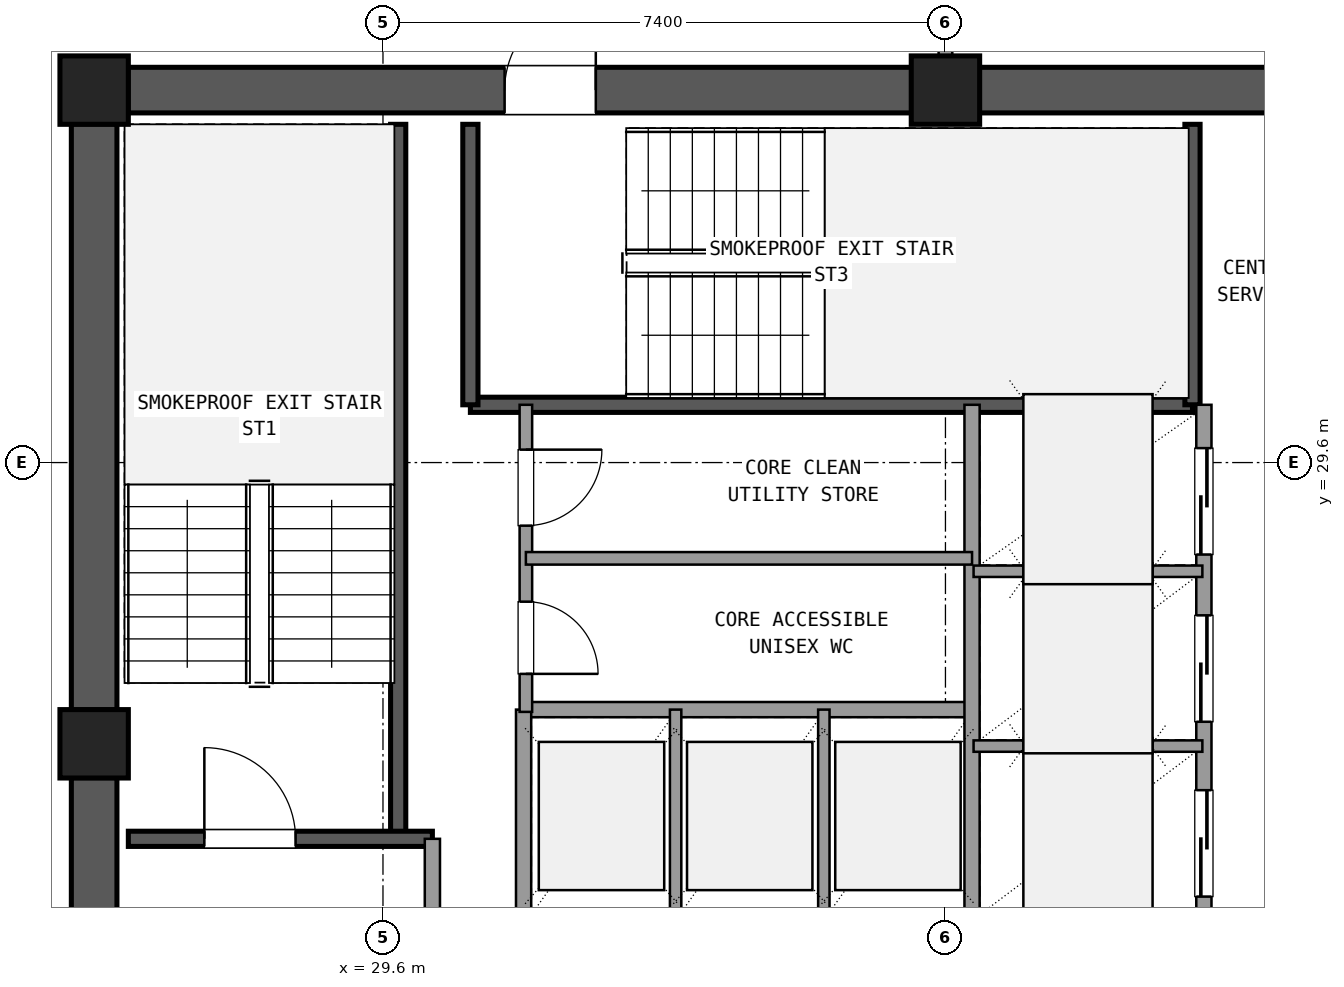
"""IFC4 building model, lengths in metres.
Left out: names, types, materials, properties, quantities, classifications, styles, units other than length and angle.
Written with IfcOpenShell. Run it as: python <this file> out.ifc"""

import sys

from ifc_helpers import new_model, si_unit, direction, frame, frame_2d, origin, origin_2d, place, context, subcontext, project, spatial, rectangle, extrude, element, fill, save


model = new_model("IFC4")
c1 = context("Model", 3, precision=1e-05, world=origin(), true_north=direction((0.0, 1.0)))
c2 = subcontext(c1, "Body", "Model", "MODEL_VIEW")
j1 = project(units=[si_unit("LENGTHUNIT", "METRE"), si_unit("PLANEANGLEUNIT", "RADIAN")], contexts=[c1])
p1 = place(None, origin())
s1 = spatial("IfcSite", under=j1, at=p1, CompositionType="ELEMENT")
p2 = place(p1, origin())
s2 = spatial("IfcBuilding", under=s1, at=p2, CompositionType="ELEMENT")
p3 = place(p2, frame((0.0, 0.0, 228.78)))
s3 = spatial("IfcBuildingStorey", under=s2, at=p3, CompositionType="ELEMENT", Elevation=228.78)
for number, where, z_axis, x_axis in (
    (1, (37.0, 34.5, 0.0), (0.0, 0.0, 1.0), (1.0, 0.0, 0.0)),
    (2, (25.8, 34.5, 0.0), (0.0, 0.0, 1.0), (1.0, 0.0, 0.0)),
    (3, (25.8, 25.9, 0.0), (0.0, 0.0, 1.0), (1.0, 0.0, 0.0)),
):
    element("IfcColumn", number, at=place(p3, frame(where, z_axis=z_axis, x_axis=x_axis)), inside=s3, PredefinedType="COLUMN", context=c2, shape_type="SweptSolid", body=[
        extrude(rectangle(XDim=0.9, YDim=0.9, at=origin_2d()), origin(), (0.0, 0.0, 1.0), 3.6),
    ])
p4 = place(p3, frame((47.755, 34.5, 0.0), z_axis=(0.0, 0.0, 1.0), x_axis=(-1.0, 0.0, 0.0)))
e4 = element("IfcWall", 4, at=p4, inside=s3, PredefinedType="SHEAR", context=c2, shape_type="SweptSolid", body=[
    extrude(rectangle(XDim=10.31, YDim=0.6, at=frame_2d((5.155, 0.0))), origin(), (0.0, 0.0, 1.0), 3.3),
])
p5 = place(p4, frame((4.655, 0.0, 0.0)))
e5 = element("IfcOpeningElement", 5, at=p5, cuts=e4, PredefinedType="OPENING", context=c2, shape_type="SweptSolid", body=[
    extrude(rectangle(XDim=1.6, YDim=2.2, at=frame_2d((0.8, 1.1))), frame((0.0, 0.31, 0.0), z_axis=(0.0, -1.0, 0.0), x_axis=(1.0, 0.0, 0.0)), (0.0, 0.0, 1.0), 0.62),
])
p6 = place(p3, frame((36.555, 34.5, 0.0), z_axis=(0.0, 0.0, 1.0), x_axis=(-1.0, 0.0, 0.0)))
e6 = element("IfcWall", 6, at=p6, inside=s3, PredefinedType="SHEAR", context=c2, shape_type="SweptSolid", body=[
    extrude(rectangle(XDim=10.31, YDim=0.6, at=frame_2d((5.155, 0.0))), origin(), (0.0, 0.0, 1.0), 3.3),
])
p7 = place(p6, frame((4.155, 0.0, 0.0)))
e7 = element("IfcOpeningElement", 7, at=p7, cuts=e6, PredefinedType="OPENING", context=c2, shape_type="SweptSolid", body=[
    extrude(rectangle(XDim=1.2, YDim=2.15, at=frame_2d((0.6, 1.075))), frame((0.0, 0.31, 0.0), z_axis=(0.0, -1.0, 0.0), x_axis=(1.0, 0.0, 0.0)), (0.0, 0.0, 1.0), 0.62),
])
p8 = place(p3, frame((25.8, 34.055, 0.0), z_axis=(0.0, 0.0, 1.0), x_axis=(0.0, -1.0, 0.0)))
e8 = element("IfcWall", 8, at=p8, inside=s3, PredefinedType="SHEAR", context=c2, shape_type="SweptSolid", body=[
    extrude(rectangle(XDim=7.71, YDim=0.6, at=frame_2d((3.855, 0.0))), origin(), (0.0, 0.0, 1.0), 3.3),
])
p9 = place(p3, frame((25.8, 25.455, 0.0), z_axis=(0.0, 0.0, 1.0), x_axis=(0.0, -1.0, 0.0)))
e9 = element("IfcWall", 9, at=p9, inside=s3, PredefinedType="SHEAR", context=c2, shape_type="SweptSolid", body=[
    extrude(rectangle(XDim=7.71, YDim=0.6, at=frame_2d((3.855, 0.0))), origin(), (0.0, 0.0, 1.0), 3.3),
])
p10 = place(p9, frame((2.205, 0.0, 0.0)))
e10 = element("IfcOpeningElement", 10, at=p10, cuts=e9, PredefinedType="OPENING", context=c2, shape_type="SweptSolid", body=[
    extrude(rectangle(XDim=1.2, YDim=2.15, at=frame_2d((0.6, 1.075))), frame((0.0, 0.31, 0.0), z_axis=(0.0, -1.0, 0.0), x_axis=(1.0, 0.0, 0.0)), (0.0, 0.0, 1.0), 0.62),
])
p11 = place(p3, frame((29.8, 24.65, 0.0), z_axis=(0.0, 0.0, 1.0), x_axis=(0.0, 1.0, 0.0)))
e11 = element("IfcWall", 11, at=p11, inside=s3, PredefinedType="SHEAR", context=c2, shape_type="SweptSolid", body=[
    extrude(rectangle(XDim=9.4, YDim=0.2, at=frame_2d((4.7, 0.0))), origin(), (0.0, 0.0, 1.0), 3.3),
])
p12 = place(p3, frame((26.25, 24.65, 0.0), z_axis=(0.0, 0.0, 1.0), x_axis=(1.0, 0.0, 0.0)))
e12 = element("IfcWall", 12, at=p12, inside=s3, PredefinedType="SHEAR", context=c2, shape_type="SweptSolid", body=[
    extrude(rectangle(XDim=4.0, YDim=0.2, at=frame_2d((2.0, 0.0))), origin(), (0.0, 0.0, 1.0), 3.3),
])
p13 = place(p12, frame((1.0, 0.0, 0.0)))
e13 = element("IfcOpeningElement", 13, at=p13, cuts=e12, PredefinedType="OPENING", context=c2, shape_type="SweptSolid", body=[
    extrude(rectangle(XDim=1.2, YDim=2.15, at=frame_2d((0.6, 1.075))), frame((0.0, 0.11, 0.0), z_axis=(0.0, -1.0, 0.0), x_axis=(1.0, 0.0, 0.0)), (0.0, 0.0, 1.0), 0.22),
])
p14 = place(p3, frame((30.75, 30.36, 0.0), z_axis=(0.0, 0.0, 1.0), x_axis=(1.0, 0.0, 0.0)))
e14 = element("IfcWall", 14, at=p14, inside=s3, PredefinedType="SHEAR", context=c2, shape_type="SweptSolid", body=[
    extrude(rectangle(XDim=9.5, YDim=0.2, at=frame_2d((4.75, 0.0))), origin(), (0.0, 0.0, 1.0), 3.3),
])
for number, where, z_axis, x_axis in (
    (15, (30.75, 30.36, 0.0), (0.0, 0.0, 1.0), (0.0, 1.0, 0.0)),
    (16, (40.25, 30.36, 0.0), (0.0, 0.0, 1.0), (0.0, 1.0, 0.0)),
):
    element("IfcWall", number, at=place(p3, frame(where, z_axis=z_axis, x_axis=x_axis)), inside=s3, PredefinedType="SHEAR", context=c2, shape_type="SweptSolid", body=[
        extrude(rectangle(XDim=3.69, YDim=0.2, at=frame_2d((1.845, 0.0))), origin(), (0.0, 0.0, 1.0), 3.3),
    ])
p15 = place(p3, frame((30.25, 17.75, 0.0), z_axis=(0.0, 0.0, 1.0), x_axis=(0.0, 1.0, 0.0)))
e17 = element("IfcWall", 17, at=p15, inside=s3, PredefinedType="SOLIDWALL", context=c2, shape_type="SweptSolid", body=[
    extrude(rectangle(XDim=6.9, YDim=0.2, at=frame_2d((3.45, 0.0))), origin(), (0.0, 0.0, 1.0), 2.59),
])
p16 = place(p15, frame((4.15, 0.0, 0.0)))
e18 = element("IfcOpeningElement", 18, at=p16, cuts=e17, PredefinedType="OPENING", context=c2, shape_type="SweptSolid", body=[
    extrude(rectangle(XDim=1.2, YDim=2.15, at=frame_2d((0.6, 1.075))), frame((0.0, 0.11, 0.0), z_axis=(0.0, -1.0, 0.0), x_axis=(1.0, 0.0, 0.0)), (0.0, 0.0, 1.0), 0.22),
])
p17 = place(p3, frame((31.45, 26.35, 0.0), z_axis=(0.0, 0.0, 1.0), x_axis=(1.0, 0.0, 0.0)))
e19 = element("IfcWall", 19, at=p17, inside=s3, PredefinedType="SOLIDWALL", context=c2, shape_type="SweptSolid", body=[
    extrude(rectangle(XDim=5.9, YDim=0.2, at=frame_2d((2.95, 0.0))), origin(), (0.0, 0.0, 1.0), 2.59),
])
p18 = place(p3, frame((31.45, 23.54, 0.0), z_axis=(0.0, 0.0, 1.0), x_axis=(0.0, 1.0, 0.0)))
e20 = element("IfcWall", 20, at=p18, inside=s3, PredefinedType="SOLIDWALL", context=c2, shape_type="SweptSolid", body=[
    extrude(rectangle(XDim=2.81, YDim=0.2, at=frame_2d((1.405, 0.0))), origin(), (0.0, 0.0, 1.0), 2.59),
])
for number, where, z_axis, x_axis in (
    (21, (33.45, 23.54, 0.0), (0.0, 0.0, 1.0), (0.0, 1.0, 0.0)),
    (22, (35.4, 23.54, 0.0), (0.0, 0.0, 1.0), (0.0, 1.0, 0.0)),
):
    element("IfcWall", number, at=place(p3, frame(where, z_axis=z_axis, x_axis=x_axis)), inside=s3, PredefinedType="PARTITIONING", context=c2, shape_type="SweptSolid", body=[
        extrude(rectangle(XDim=2.81, YDim=0.15, at=frame_2d((1.405, 0.0))), origin(), (0.0, 0.0, 1.0), 2.59),
    ])
p19 = place(p3, frame((37.35, 23.54, 0.0), z_axis=(0.0, 0.0, 1.0), x_axis=(0.0, 1.0, 0.0)))
e23 = element("IfcWall", 23, at=p19, inside=s3, PredefinedType="SOLIDWALL", context=c2, shape_type="SweptSolid", body=[
    extrude(rectangle(XDim=6.82, YDim=0.2, at=frame_2d((3.41, 0.0))), origin(), (0.0, 0.0, 1.0), 2.59),
])
p20 = place(p3, frame((40.4, 23.54, 0.0), z_axis=(0.0, 0.0, 1.0), x_axis=(0.0, 1.0, 0.0)))
e24 = element("IfcWall", 24, at=p20, inside=s3, PredefinedType="SOLIDWALL", context=c2, shape_type="SweptSolid", body=[
    extrude(rectangle(XDim=6.82, YDim=0.2, at=frame_2d((3.41, 0.0))), origin(), (0.0, 0.0, 1.0), 2.59),
])
p21 = place(p20, frame((0.35, 0.0, 0.0)))
e25 = element("IfcOpeningElement", 25, at=p21, cuts=e24, PredefinedType="OPENING", context=c2, shape_type="SweptSolid", body=[
    extrude(rectangle(XDim=1.4, YDim=2.2, at=frame_2d((0.7, 1.1))), frame((0.0, 0.11, 0.0), z_axis=(0.0, -1.0, 0.0), x_axis=(1.0, 0.0, 0.0)), (0.0, 0.0, 1.0), 0.22),
])
p22 = place(p20, frame((2.65, 0.0, 0.0)))
e26 = element("IfcOpeningElement", 26, at=p22, cuts=e24, PredefinedType="OPENING", context=c2, shape_type="SweptSolid", body=[
    extrude(rectangle(XDim=1.4, YDim=2.2, at=frame_2d((0.7, 1.1))), frame((0.0, 0.11, 0.0), z_axis=(0.0, -1.0, 0.0), x_axis=(1.0, 0.0, 0.0)), (0.0, 0.0, 1.0), 0.22),
])
p23 = place(p20, frame((4.85, 0.0, 0.0)))
e27 = element("IfcOpeningElement", 27, at=p23, cuts=e24, PredefinedType="OPENING", context=c2, shape_type="SweptSolid", body=[
    extrude(rectangle(XDim=1.4, YDim=2.2, at=frame_2d((0.7, 1.1))), frame((0.0, 0.11, 0.0), z_axis=(0.0, -1.0, 0.0), x_axis=(1.0, 0.0, 0.0)), (0.0, 0.0, 1.0), 0.22),
])
for number, where, z_axis, x_axis in (
    (28, (37.37, 25.87, 0.0), (0.0, 0.0, 1.0), (1.0, 0.0, 0.0)),
    (29, (37.37, 28.17, 0.0), (0.0, 0.0, 1.0), (1.0, 0.0, 0.0)),
):
    element("IfcWall", number, at=place(p3, frame(where, z_axis=z_axis, x_axis=x_axis)), inside=s3, PredefinedType="PARTITIONING", context=c2, shape_type="SweptSolid", body=[
        extrude(rectangle(XDim=3.01, YDim=0.15, at=frame_2d((1.505, 0.0))), origin(), (0.0, 0.0, 1.0), 2.59),
    ])
p24 = place(p3, frame((31.48, 26.32, 0.0), z_axis=(0.0, 0.0, 1.0), x_axis=(0.0, 1.0, 0.0)))
e30 = element("IfcWall", 30, at=p24, inside=s3, PredefinedType="PLUMBINGWALL", context=c2, shape_type="SweptSolid", body=[
    extrude(rectangle(XDim=4.04, YDim=0.165, at=frame_2d((2.02, 0.0))), origin(), (0.0, 0.0, 1.0), 2.59),
])
p25 = place(p24, frame((0.5, 0.0, 0.0)))
e31 = element("IfcOpeningElement", 31, at=p25, cuts=e30, PredefinedType="OPENING", context=c2, shape_type="SweptSolid", body=[
    extrude(rectangle(XDim=0.95, YDim=2.1, at=frame_2d((0.475, 1.05))), frame((0.0, 0.093, 0.0), z_axis=(0.0, -1.0, 0.0), x_axis=(1.0, 0.0, 0.0)), (0.0, 0.0, 1.0), 0.185),
])
p26 = place(p24, frame((2.45, 0.0, 0.0)))
e32 = element("IfcOpeningElement", 32, at=p26, cuts=e30, PredefinedType="OPENING", context=c2, shape_type="SweptSolid", body=[
    extrude(rectangle(XDim=1.0, YDim=2.15, at=frame_2d((0.5, 1.075))), frame((0.0, 0.093, 0.0), z_axis=(0.0, -1.0, 0.0), x_axis=(1.0, 0.0, 0.0)), (0.0, 0.0, 1.0), 0.185),
])
p27 = place(p3, frame((31.48, 28.34, 0.0), z_axis=(0.0, 0.0, 1.0), x_axis=(1.0, 0.0, 0.0)))
e33 = element("IfcWall", 33, at=p27, inside=s3, PredefinedType="PLUMBINGWALL", context=c2, shape_type="SweptSolid", body=[
    extrude(rectangle(XDim=5.87, YDim=0.165, at=frame_2d((2.935, 0.0))), origin(), (0.0, 0.0, 1.0), 2.59),
])
p28 = place(p3, frame((37.0, 34.95, 0.0), z_axis=(0.0, 0.0, 1.0), x_axis=(0.0, 1.0, 0.0)))
e34 = element("IfcWall", 34, at=p28, inside=s3, PredefinedType="PARTITIONING", context=c2, shape_type="SweptSolid", body=[
    extrude(rectangle(XDim=2.7, YDim=0.18, at=frame_2d((1.35, 0.0))), origin(), (0.0, 0.0, 1.0), 2.59),
])
p29 = place(p28, frame((0.35, 0.0, 0.0)))
e35 = element("IfcOpeningElement", 35, at=p29, cuts=e34, PredefinedType="OPENING", context=c2, shape_type="SweptSolid", body=[
    extrude(rectangle(XDim=2.0, YDim=2.2, at=frame_2d((1.0, 1.1))), frame((0.0, 0.1, 0.0), z_axis=(0.0, -1.0, 0.0), x_axis=(1.0, 0.0, 0.0)), (0.0, 0.0, 1.0), 0.2),
])
p30 = place(p13, origin())
e36 = element("IfcDoor", 36, at=p30, inside=s3, OperationType="SINGLE_SWING_LEFT", PredefinedType="DOOR", context=c2, shape_type="SweptSolid", body=[
    extrude(rectangle(XDim=1.2, YDim=2.15, at=frame_2d((0.6, 1.075))), frame((0.0, 0.025, 0.0), z_axis=(0.0, -1.0, 0.0), x_axis=(1.0, 0.0, 0.0)), (0.0, 0.0, 1.0), 0.05),
])
fill(e13, e36)
p31 = place(p7, frame((1.2, 0.0, 0.0), z_axis=(0.0, 0.0, 1.0), x_axis=(-1.0, 0.0, 0.0)))
e37 = element("IfcDoor", 37, at=p31, inside=s3, OperationType="SINGLE_SWING_LEFT", PredefinedType="DOOR", context=c2, shape_type="SweptSolid", body=[
    extrude(rectangle(XDim=1.2, YDim=2.15, at=frame_2d((0.6, 1.075))), frame((0.0, 0.025, 0.0), z_axis=(0.0, -1.0, 0.0), x_axis=(1.0, 0.0, 0.0)), (0.0, 0.0, 1.0), 0.05),
])
fill(e7, e37)
p32 = place(p21, origin())
e38 = element("IfcDoor", 38, at=p32, inside=s3, OperationType="SLIDING_TO_LEFT", PredefinedType="DOOR", context=c2, shape_type="SweptSolid", body=[
    extrude(rectangle(XDim=1.4, YDim=2.2, at=frame_2d((0.7, 1.1))), frame((0.0, 0.025, 0.0), z_axis=(0.0, -1.0, 0.0), x_axis=(1.0, 0.0, 0.0)), (0.0, 0.0, 1.0), 0.05),
])
fill(e25, e38)
p33 = place(p22, origin())
e39 = element("IfcDoor", 39, at=p33, inside=s3, OperationType="SLIDING_TO_LEFT", PredefinedType="DOOR", context=c2, shape_type="SweptSolid", body=[
    extrude(rectangle(XDim=1.4, YDim=2.2, at=frame_2d((0.7, 1.1))), frame((0.0, 0.025, 0.0), z_axis=(0.0, -1.0, 0.0), x_axis=(1.0, 0.0, 0.0)), (0.0, 0.0, 1.0), 0.05),
])
fill(e26, e39)
p34 = place(p23, origin())
e40 = element("IfcDoor", 40, at=p34, inside=s3, OperationType="SLIDING_TO_RIGHT", PredefinedType="DOOR", context=c2, shape_type="SweptSolid", body=[
    extrude(rectangle(XDim=1.4, YDim=2.2, at=frame_2d((0.7, 1.1))), frame((0.0, 0.025, 0.0), z_axis=(0.0, -1.0, 0.0), x_axis=(1.0, 0.0, 0.0)), (0.0, 0.0, 1.0), 0.05),
])
fill(e27, e40)
p35 = place(p25, frame((0.95, 0.0, 0.0), z_axis=(0.0, 0.0, 1.0), x_axis=(-1.0, 0.0, 0.0)))
e41 = element("IfcDoor", 41, at=p35, inside=s3, OperationType="SINGLE_SWING_LEFT", PredefinedType="DOOR", context=c2, shape_type="SweptSolid", body=[
    extrude(rectangle(XDim=0.95, YDim=2.1, at=frame_2d((0.475, 1.05))), frame((0.0, 0.025, 0.0), z_axis=(0.0, -1.0, 0.0), x_axis=(1.0, 0.0, 0.0)), (0.0, 0.0, 1.0), 0.05),
])
fill(e31, e41)
p36 = place(p26, frame((1.0, 0.0, 0.0), z_axis=(0.0, 0.0, 1.0), x_axis=(-1.0, 0.0, 0.0)))
e42 = element("IfcDoor", 42, at=p36, inside=s3, OperationType="SINGLE_SWING_RIGHT", PredefinedType="DOOR", context=c2, shape_type="SweptSolid", body=[
    extrude(rectangle(XDim=1.0, YDim=2.15, at=frame_2d((0.5, 1.075))), frame((0.0, 0.025, 0.0), z_axis=(0.0, -1.0, 0.0), x_axis=(1.0, 0.0, 0.0)), (0.0, 0.0, 1.0), 0.05),
])
fill(e32, e42)
save(model, sys.argv[1])
